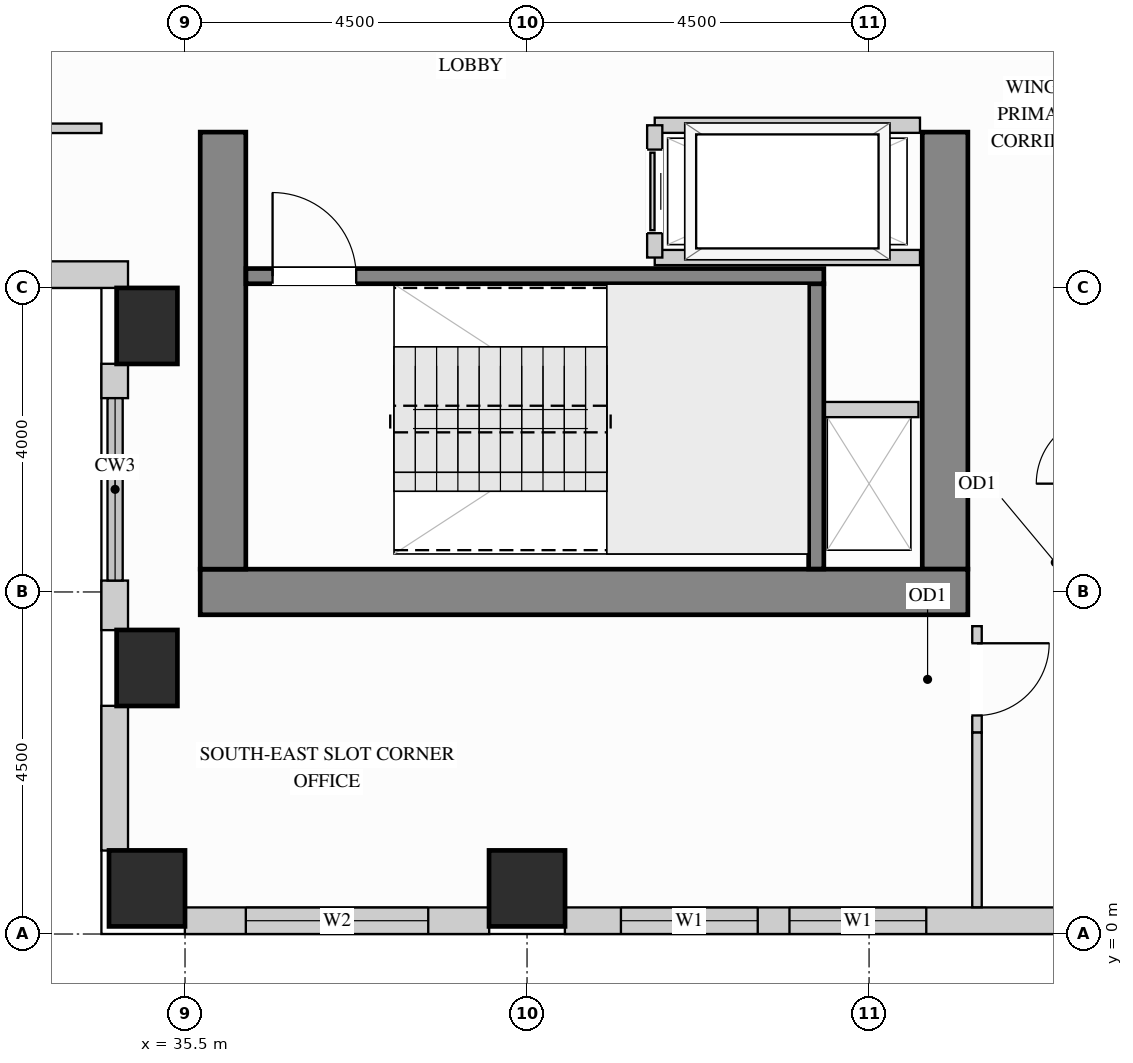
"""IFC4 building model, lengths in metres.
Left out: names, types, materials, properties, quantities, classifications, styles, units other than length and angle.
Written with IfcOpenShell. Run it as: python <this file> out.ifc"""

import sys

from ifc_helpers import new_model, si_unit, direction, frame, frame_2d, origin, origin_2d, place, context, subcontext, project, spatial, rectangle, extrude, source, transform, mapped, element, fill, save


model = new_model("IFC4")
c1 = context("Model", 3, precision=1e-05, world=origin(), true_north=direction((0.0, 1.0)))
c2 = subcontext(c1, "Body", "Model", "MODEL_VIEW")
j1 = project(units=[si_unit("LENGTHUNIT", "METRE"), si_unit("PLANEANGLEUNIT", "RADIAN")], contexts=[c1])
p1 = place(None, origin())
s1 = spatial("IfcSite", under=j1, at=p1, CompositionType="ELEMENT")
p2 = place(p1, origin())
s2 = spatial("IfcBuilding", under=s1, at=p2, CompositionType="ELEMENT")
p3 = place(p2, frame((0.0, 0.0, 189.9)))
s3 = spatial("IfcBuildingStorey", under=s2, at=p3, CompositionType="ELEMENT", Elevation=189.9)
m1 = source(origin(), c2, "Body", "SweptSolid", [
    extrude(rectangle(XDim=0.8, YDim=1.0, at=origin_2d()), origin(), (0.0, 0.0, 1.0), 3.4),
])
for number, where, z_axis, x_axis in (
    (1, (35.0, 3.5, 0.0), (0.0, 0.0, 1.0), (1.0, 0.0, 0.0)),
    (2, (35.0, 8.0, 0.0), (0.0, 0.0, 1.0), (1.0, 0.0, 0.0)),
):
    element("IfcColumn", number, at=place(p3, frame(where, z_axis=z_axis, x_axis=x_axis)), inside=s3, PredefinedType="COLUMN", context=c2, shape_type="MappedRepresentation", body=[
        mapped(m1, transform((0.0, 0.0, 0.0), x_axis=(1.0, 0.0, 0.0), y_axis=(0.0, 1.0, 0.0), z_axis=(0.0, 0.0, 1.0))),
    ])
m2 = source(origin(), c2, "Body", "SweptSolid", [
    extrude(rectangle(XDim=1.0, YDim=1.0, at=origin_2d()), origin(), (0.0, 0.0, 1.0), 3.4),
])
for number, where, z_axis, x_axis in (
    (3, (35.0, 0.6, 0.0), (0.0, 0.0, 1.0), (1.0, 0.0, 0.0)),
    (4, (40.0, 0.6, 0.0), (0.0, 0.0, 1.0), (1.0, 0.0, 0.0)),
):
    element("IfcColumn", number, at=place(p3, frame(where, z_axis=z_axis, x_axis=x_axis)), inside=s3, PredefinedType="COLUMN", context=c2, shape_type="MappedRepresentation", body=[
        mapped(m2, transform((0.0, 0.0, 0.0), x_axis=(1.0, 0.0, 0.0), y_axis=(0.0, 1.0, 0.0), z_axis=(0.0, 0.0, 1.0))),
    ])
m3 = source(origin(), c2, "Body", "SweptSolid", [
    extrude(rectangle(XDim=5.75, YDim=0.6, at=frame_2d((2.875, 0.0))), origin(), (0.0, 0.0, 1.0), 3.4),
])
p4 = place(p3, frame((45.5, 4.8, 0.0), z_axis=(0.0, 0.0, 1.0), x_axis=(0.0, 1.0, 0.0)))
e5 = element("IfcWall", 5, at=p4, inside=s3, PredefinedType="SHEAR", context=c2, shape_type="MappedRepresentation", body=[
    mapped(m3, transform((0.0, 0.0, 0.0), x_axis=(1.0, 0.0, 0.0), y_axis=(0.0, 1.0, 0.0), z_axis=(0.0, 0.0, 1.0))),
])
m4 = source(origin(), c2, "Body", "SweptSolid", [
    extrude(rectangle(XDim=10.1, YDim=0.6, at=frame_2d((5.05, 0.0))), origin(), (0.0, 0.0, 1.0), 3.4),
])
p5 = place(p3, frame((35.7, 4.5, 0.0), z_axis=(0.0, 0.0, 1.0), x_axis=(1.0, 0.0, 0.0)))
e6 = element("IfcWall", 6, at=p5, inside=s3, PredefinedType="SHEAR", context=c2, shape_type="MappedRepresentation", body=[
    mapped(m4, transform((0.0, 0.0, 0.0), x_axis=(1.0, 0.0, 0.0), y_axis=(0.0, 1.0, 0.0), z_axis=(0.0, 0.0, 1.0))),
])
p6 = place(p3, frame((36.0, 4.8, 0.0), z_axis=(0.0, 0.0, 1.0), x_axis=(0.0, 1.0, 0.0)))
e7 = element("IfcWall", 7, at=p6, inside=s3, PredefinedType="SHEAR", context=c2, shape_type="MappedRepresentation", body=[
    mapped(m3, transform((0.0, 0.0, 0.0), x_axis=(1.0, 0.0, 0.0), y_axis=(0.0, 1.0, 0.0), z_axis=(0.0, 0.0, 1.0))),
])
p7 = place(p3, frame((30.898, 8.675, 0.0), z_axis=(0.0, 0.0, 1.0), x_axis=(1.0, 0.0, 0.0)))
e8 = element("IfcWall", 8, at=p7, inside=s3, PredefinedType="SOLIDWALL", context=c2, shape_type="SweptSolid", body=[
    extrude(rectangle(XDim=3.852, YDim=0.35, at=frame_2d((1.926, 0.0))), origin(), (0.0, 0.0, 1.0), 3.385),
])
p8 = place(p7, frame((1.176, 0.0, 0.78)))
e9 = element("IfcOpeningElement", 9, at=p8, cuts=e8, PredefinedType="OPENING", context=c2, shape_type="SweptSolid", body=[
    extrude(rectangle(XDim=1.5, YDim=2.0, at=frame_2d((0.75, 1.0))), frame((0.0, 0.185, 0.0), z_axis=(0.0, -1.0, 0.0), x_axis=(1.0, 0.0, 0.0)), (0.0, 0.0, 1.0), 0.37),
])
m5 = source(origin(), c2, "Body", "SweptSolid", [
    extrude(rectangle(XDim=0.452, YDim=0.35, at=frame_2d((0.226, 0.0))), origin(), (0.0, 0.0, 1.0), 2.612),
])
p9 = place(p3, frame((34.575, 7.502, 0.0), z_axis=(0.0, 0.0, 1.0), x_axis=(0.0, -1.0, 0.0)))
e10 = element("IfcWall", 10, at=p9, inside=s3, PredefinedType="SOLIDWALL", context=c2, shape_type="MappedRepresentation", body=[
    mapped(m5, transform((0.0, 0.0, 0.0), x_axis=(1.0, 0.0, 0.0), y_axis=(0.0, 1.0, 0.0), z_axis=(0.0, 0.0, 1.0))),
])
m6 = source(origin(), c2, "Body", "SweptSolid", [
    extrude(rectangle(XDim=0.652, YDim=0.35, at=frame_2d((0.326, 0.0))), origin(), (0.0, 0.0, 1.0), 2.612),
])
p10 = place(p3, frame((34.575, 4.65, 0.0), z_axis=(0.0, 0.0, 1.0), x_axis=(0.0, -1.0, 0.0)))
e11 = element("IfcWall", 11, at=p10, inside=s3, PredefinedType="SOLIDWALL", context=c2, shape_type="MappedRepresentation", body=[
    mapped(m6, transform((0.0, 0.0, 0.0), x_axis=(1.0, 0.0, 0.0), y_axis=(0.0, 1.0, 0.0), z_axis=(0.0, 0.0, 1.0))),
])
m7 = source(origin(), c2, "Body", "SweptSolid", [
    extrude(rectangle(XDim=1.904, YDim=0.35, at=frame_2d((0.952, 0.0))), origin(), (0.0, 0.0, 1.0), 2.612),
])
p11 = place(p3, frame((34.575, 3.002, 0.0), z_axis=(0.0, 0.0, 1.0), x_axis=(0.0, -1.0, 0.0)))
e12 = element("IfcWall", 12, at=p11, inside=s3, PredefinedType="SOLIDWALL", context=c2, shape_type="MappedRepresentation", body=[
    mapped(m7, transform((0.0, 0.0, 0.0), x_axis=(1.0, 0.0, 0.0), y_axis=(0.0, 1.0, 0.0), z_axis=(0.0, 0.0, 1.0))),
])
p12 = place(p3, frame((35.498, 0.175, 0.0), z_axis=(0.0, 0.0, 1.0), x_axis=(1.0, 0.0, 0.0)))
e13 = element("IfcWall", 13, at=p12, inside=s3, PredefinedType="SOLIDWALL", context=c2, shape_type="SweptSolid", body=[
    extrude(rectangle(XDim=4.004, YDim=0.35, at=frame_2d((2.002, 0.0))), origin(), (0.0, 0.0, 1.0), 2.448),
])
p13 = place(p12, frame((0.802, 0.0, 0.78)))
e14 = element("IfcOpeningElement", 14, at=p13, cuts=e13, PredefinedType="OPENING", context=c2, shape_type="SweptSolid", body=[
    extrude(rectangle(XDim=2.4, YDim=1.488, at=frame_2d((1.2, 0.744))), frame((0.0, 0.185, 0.0), z_axis=(0.0, -1.0, 0.0), x_axis=(1.0, 0.0, 0.0)), (0.0, 0.0, 1.0), 0.37),
])
p14 = place(p3, frame((40.498, 0.175, 0.0), z_axis=(0.0, 0.0, 1.0), x_axis=(1.0, 0.0, 0.0)))
e15 = element("IfcWall", 15, at=p14, inside=s3, PredefinedType="SOLIDWALL", context=c2, shape_type="SweptSolid", body=[
    extrude(rectangle(XDim=6.604, YDim=0.35, at=frame_2d((3.302, 0.0))), origin(), (0.0, 0.0, 1.0), 2.448),
])
p15 = place(p14, frame((0.737, 0.0, 0.78)))
e16 = element("IfcOpeningElement", 16, at=p15, cuts=e15, PredefinedType="OPENING", context=c2, shape_type="SweptSolid", body=[
    extrude(rectangle(XDim=1.8, YDim=1.488, at=frame_2d((0.9, 0.744))), frame((0.0, 0.185, 0.0), z_axis=(0.0, -1.0, 0.0), x_axis=(1.0, 0.0, 0.0)), (0.0, 0.0, 1.0), 0.37),
])
p16 = place(p14, frame((2.955, 0.0, 0.78)))
e17 = element("IfcOpeningElement", 17, at=p16, cuts=e15, PredefinedType="OPENING", context=c2, shape_type="SweptSolid", body=[
    extrude(rectangle(XDim=1.8, YDim=1.488, at=frame_2d((0.9, 0.744))), frame((0.0, 0.185, 0.0), z_axis=(0.0, -1.0, 0.0), x_axis=(1.0, 0.0, 0.0)), (0.0, 0.0, 1.0), 0.37),
])
p17 = place(p3, frame((45.92, 2.65, 0.0), z_axis=(0.0, 0.0, 1.0), x_axis=(0.0, 1.0, 0.0)))
e18 = element("IfcWall", 18, at=p17, inside=s3, PredefinedType="PARTITIONING", context=c2, shape_type="SweptSolid", body=[
    extrude(rectangle(XDim=1.4, YDim=0.125, at=frame_2d((0.7, 0.0))), origin(), (0.0, 0.0, 1.0), 3.385),
])
p18 = place(p17, frame((0.225, 0.0, 0.0)))
e19 = element("IfcOpeningElement", 19, at=p18, cuts=e18, PredefinedType="OPENING", context=c2, shape_type="SweptSolid", body=[
    extrude(rectangle(XDim=0.95, YDim=2.15, at=frame_2d((0.475, 1.075))), frame((0.0, 0.073, 0.0), z_axis=(0.0, -1.0, 0.0), x_axis=(1.0, 0.0, 0.0)), (0.0, 0.0, 1.0), 0.145),
])
m8 = source(origin(), c2, "Body", "SweptSolid", [
    extrude(rectangle(XDim=2.298, YDim=0.125, at=frame_2d((1.149, 0.0))), origin(), (0.0, 0.0, 1.0), 3.385),
])
p19 = place(p3, frame((45.92, 0.352, 0.0), z_axis=(0.0, 0.0, 1.0), x_axis=(0.0, 1.0, 0.0)))
e20 = element("IfcWall", 20, at=p19, inside=s3, PredefinedType="PARTITIONING", context=c2, shape_type="MappedRepresentation", body=[
    mapped(m8, transform((0.0, 0.0, 0.0), x_axis=(1.0, 0.0, 0.0), y_axis=(0.0, 1.0, 0.0), z_axis=(0.0, 0.0, 1.0))),
])
p20 = place(p3, frame((29.85, 10.6, 0.0), z_axis=(0.0, 0.0, 1.0), x_axis=(1.0, 0.0, 0.0)))
e21 = element("IfcWall", 21, at=p20, inside=s3, PredefinedType="PARTITIONING", context=c2, shape_type="SweptSolid", body=[
    extrude(rectangle(XDim=4.55, YDim=0.125, at=frame_2d((2.275, 0.0))), origin(), (0.0, 0.0, 1.0), 3.385),
])
p21 = place(p20, frame((1.8, 0.0, 0.0)))
e22 = element("IfcOpeningElement", 22, at=p21, cuts=e21, PredefinedType="OPENING", context=c2, shape_type="SweptSolid", body=[
    extrude(rectangle(XDim=0.95, YDim=2.15, at=frame_2d((0.475, 1.075))), frame((0.0, 0.073, 0.0), z_axis=(0.0, -1.0, 0.0), x_axis=(1.0, 0.0, 0.0)), (0.0, 0.0, 1.0), 0.145),
])
m9 = source(origin(), c2, "Body", "SweptSolid", [
    extrude(rectangle(XDim=1.3, YDim=0.2, at=frame_2d((0.65, 0.0))), origin(), (0.0, 0.0, 1.0), 3.385),
])
p22 = place(p3, frame((43.85, 6.9, 0.0), z_axis=(0.0, 0.0, 1.0), x_axis=(1.0, 0.0, 0.0)))
e23 = element("IfcWall", 23, at=p22, inside=s3, PredefinedType="PARTITIONING", context=c2, shape_type="MappedRepresentation", body=[
    mapped(m9, transform((0.0, 0.0, 0.0), x_axis=(1.0, 0.0, 0.0), y_axis=(0.0, 1.0, 0.0), z_axis=(0.0, 0.0, 1.0))),
])
m10 = source(origin(), c2, "Body", "SweptSolid", [
    extrude(rectangle(XDim=3.49, YDim=0.2, at=frame_2d((1.745, 0.0))), origin(), (0.0, 0.0, 1.0), 3.385),
])
for number, where, z_axis, x_axis in (
    (24, (41.68, 10.64, 0.0), (0.0, 0.0, 1.0), (1.0, 0.0, 0.0)),
    (25, (41.68, 8.9, 0.0), (0.0, 0.0, 1.0), (1.0, 0.0, 0.0)),
):
    element("IfcWall", number, at=place(p3, frame(where, z_axis=z_axis, x_axis=x_axis)), inside=s3, PredefinedType="PARTITIONING", context=c2, shape_type="MappedRepresentation", body=[
        mapped(m10, transform((0.0, 0.0, 0.0), x_axis=(1.0, 0.0, 0.0), y_axis=(0.0, 1.0, 0.0), z_axis=(0.0, 0.0, 1.0))),
    ])
p23 = place(p3, frame((41.68, 8.9, 0.0), z_axis=(0.0, 0.0, 1.0), x_axis=(0.0, 1.0, 0.0)))
e26 = element("IfcWall", 26, at=p23, inside=s3, PredefinedType="PARTITIONING", context=c2, shape_type="SweptSolid", body=[
    extrude(rectangle(XDim=1.74, YDim=0.2, at=frame_2d((0.87, 0.0))), origin(), (0.0, 0.0, 1.0), 3.385),
])
p24 = place(p23, frame((0.32, 0.0, 0.0)))
e27 = element("IfcOpeningElement", 27, at=p24, cuts=e26, PredefinedType="OPENING", context=c2, shape_type="SweptSolid", body=[
    extrude(rectangle(XDim=1.1, YDim=2.2, at=frame_2d((0.55, 1.1))), frame((0.0, 0.11, 0.0), z_axis=(0.0, -1.0, 0.0), x_axis=(1.0, 0.0, 0.0)), (0.0, 0.0, 1.0), 0.22),
])
m11 = source(origin(), c2, "Body", "SweptSolid", [
    extrude(rectangle(XDim=3.753, YDim=0.2, at=frame_2d((1.876, 0.0))), origin(), (0.0, 0.0, 1.0), 3.4),
])
p25 = place(p3, frame((43.805, 4.802, 0.0), z_axis=(0.0, 0.0, 1.0), x_axis=(0.0, 1.0, 0.0)))
e28 = element("IfcWall", 28, at=p25, inside=s3, PredefinedType="SHEAR", context=c2, shape_type="MappedRepresentation", body=[
    mapped(m11, transform((0.0, 0.0, 0.0), x_axis=(1.0, 0.0, 0.0), y_axis=(0.0, 1.0, 0.0), z_axis=(0.0, 0.0, 1.0))),
])
p26 = place(p3, frame((36.302, 8.655, 0.0), z_axis=(0.0, 0.0, 1.0), x_axis=(1.0, 0.0, 0.0)))
e29 = element("IfcWall", 29, at=p26, inside=s3, PredefinedType="SHEAR", context=c2, shape_type="SweptSolid", body=[
    extrude(rectangle(XDim=7.603, YDim=0.2, at=frame_2d((3.802, 0.0))), origin(), (0.0, 0.0, 1.0), 3.4),
])
p27 = place(p26, frame((0.35, 0.0, 0.0)))
e30 = element("IfcOpeningElement", 30, at=p27, cuts=e29, PredefinedType="OPENING", context=c2, shape_type="SweptSolid", body=[
    extrude(rectangle(XDim=1.1, YDim=2.15, at=frame_2d((0.55, 1.075))), frame((0.0, 0.11, 0.0), z_axis=(0.0, -1.0, 0.0), x_axis=(1.0, 0.0, 0.0)), (0.0, 0.0, 1.0), 0.22),
])
m12 = source(origin(), c2, "Body", "SweptSolid", [
    extrude(rectangle(XDim=1.1, YDim=2.2, at=frame_2d((0.55, 1.1))), frame((0.0, 0.025, 0.0), z_axis=(0.0, -1.0, 0.0), x_axis=(1.0, 0.0, 0.0)), (0.0, 0.0, 1.0), 0.05),
])
p28 = place(p24, origin())
e31 = element("IfcDoor", 31, at=p28, inside=s3, OperationType="SLIDING_TO_LEFT", PredefinedType="DOOR", context=c2, shape_type="MappedRepresentation", body=[
    mapped(m12, transform((0.0, 0.0, 0.0), x_axis=(1.0, 0.0, 0.0), y_axis=(0.0, 1.0, 0.0), z_axis=(0.0, 0.0, 1.0))),
])
fill(e27, e31)
m13 = source(origin(), c2, "Body", "SweptSolid", [
    extrude(rectangle(XDim=0.95, YDim=2.15, at=frame_2d((0.475, 1.075))), frame((0.0, 0.025, 0.0), z_axis=(0.0, -1.0, 0.0), x_axis=(1.0, 0.0, 0.0)), (0.0, 0.0, 1.0), 0.05),
])
p29 = place(p18, origin())
e32 = element("IfcDoor", 32, at=p29, inside=s3, OperationType="SINGLE_SWING_RIGHT", PredefinedType="DOOR", context=c2, shape_type="MappedRepresentation", body=[
    mapped(m13, transform((0.0, 0.0, 0.0), x_axis=(1.0, 0.0, 0.0), y_axis=(0.0, 1.0, 0.0), z_axis=(0.0, 0.0, 1.0))),
])
fill(e19, e32)
m14 = source(origin(), c2, "Body", "SweptSolid", [
    extrude(rectangle(XDim=1.1, YDim=2.15, at=frame_2d((0.55, 1.075))), frame((0.0, 0.025, 0.0), z_axis=(0.0, -1.0, 0.0), x_axis=(1.0, 0.0, 0.0)), (0.0, 0.0, 1.0), 0.05),
])
p30 = place(p27, origin())
e33 = element("IfcDoor", 33, at=p30, inside=s3, OperationType="SINGLE_SWING_LEFT", PredefinedType="DOOR", context=c2, shape_type="MappedRepresentation", body=[
    mapped(m14, transform((0.0, 0.0, 0.0), x_axis=(1.0, 0.0, 0.0), y_axis=(0.0, 1.0, 0.0), z_axis=(0.0, 0.0, 1.0))),
])
fill(e30, e33)
m15 = source(origin(), c2, "Body", "SweptSolid", [
    extrude(rectangle(XDim=1.8, YDim=1.488, at=frame_2d((0.9, 0.744))), frame((0.0, 0.03, 0.0), z_axis=(0.0, -1.0, 0.0), x_axis=(1.0, 0.0, 0.0)), (0.0, 0.0, 1.0), 0.06),
])
p31 = place(p15, origin())
e34 = element("IfcWindow", 34, at=p31, inside=s3, PartitioningType="SINGLE_PANEL", PredefinedType="WINDOW", context=c2, shape_type="MappedRepresentation", body=[
    mapped(m15, transform((0.0, 0.0, 0.0), x_axis=(1.0, 0.0, 0.0), y_axis=(0.0, 1.0, 0.0), z_axis=(0.0, 0.0, 1.0))),
])
fill(e16, e34)
p32 = place(p16, origin())
e35 = element("IfcWindow", 35, at=p32, inside=s3, PartitioningType="SINGLE_PANEL", PredefinedType="WINDOW", context=c2, shape_type="MappedRepresentation", body=[
    mapped(m15, transform((0.0, 0.0, 0.0), x_axis=(1.0, 0.0, 0.0), y_axis=(0.0, 1.0, 0.0), z_axis=(0.0, 0.0, 1.0))),
])
fill(e17, e35)
m16 = source(origin(), c2, "Body", "SweptSolid", [
    extrude(rectangle(XDim=2.4, YDim=1.488, at=frame_2d((1.2, 0.744))), frame((0.0, 0.03, 0.0), z_axis=(0.0, -1.0, 0.0), x_axis=(1.0, 0.0, 0.0)), (0.0, 0.0, 1.0), 0.06),
])
p33 = place(p13, origin())
e36 = element("IfcWindow", 36, at=p33, inside=s3, PartitioningType="SINGLE_PANEL", PredefinedType="WINDOW", context=c2, shape_type="MappedRepresentation", body=[
    mapped(m16, transform((0.0, 0.0, 0.0), x_axis=(1.0, 0.0, 0.0), y_axis=(0.0, 1.0, 0.0), z_axis=(0.0, 0.0, 1.0))),
])
fill(e14, e36)
save(model, sys.argv[1])
